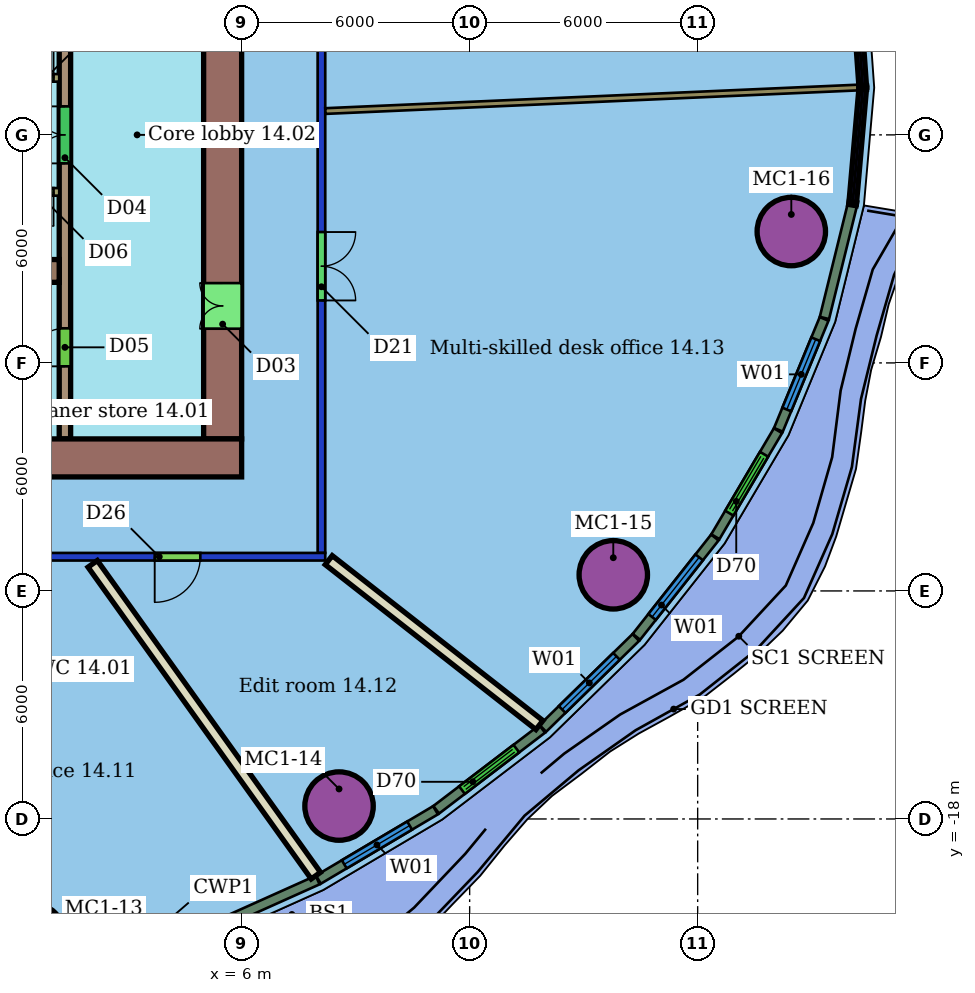
"""IFC4 building model, lengths in metres.
Left out: names, types, materials, properties, quantities, classifications, styles, units other than length and angle.
Written with IfcOpenShell. Run it as: python <this file> out.ifc"""

import sys

from ifc_helpers import new_model, si_unit, direction, frame, frame_2d, origin, origin_2d, place, context, subcontext, project, spatial, rectangle, hollow_circle, extrude, element, fill, save


model = new_model("IFC4")
c1 = context("Model", 3, precision=1e-05, world=origin(), true_north=direction((0.0, 1.0)))
c2 = subcontext(c1, "Body", "Model", "MODEL_VIEW")
j1 = project(units=[si_unit("LENGTHUNIT", "METRE"), si_unit("PLANEANGLEUNIT", "RADIAN")], contexts=[c1])
p1 = place(None, origin())
s1 = spatial("IfcSite", under=j1, at=p1, CompositionType="ELEMENT")
p2 = place(p1, origin())
s2 = spatial("IfcBuilding", under=s1, at=p2, CompositionType="ELEMENT")
p3 = place(p2, frame((0.0, 0.0, 69.3)))
s3 = spatial("IfcBuildingStorey", under=s2, at=p3, CompositionType="ELEMENT", Elevation=69.3)
for number, where, z_axis, x_axis in (
    (1, (0.458, -21.108, 0.0), (0.0, 0.0, 1.0), (1.0, 0.0, 0.0)),
    (2, (8.563, -17.66, 0.0), (0.0, 0.0, 1.0), (1.0, 0.0, 0.0)),
    (3, (15.78, -11.576, 0.0), (0.0, 0.0, 1.0), (1.0, 0.0, 0.0)),
    (4, (20.464, -2.543, 0.0), (0.0, 0.0, 1.0), (1.0, 0.0, 0.0)),
):
    element("IfcColumn", number, at=place(p3, frame(where, z_axis=z_axis, x_axis=x_axis)), inside=s3, PredefinedType="COLUMN", context=c2, shape_type="SweptSolid", body=[
        extrude(hollow_circle(Radius=0.9, WallThickness=0.06, at=origin_2d()), origin(), (0.0, 0.0, 1.0), 3.55),
    ])
p4 = place(p3, frame((8.2, -11.1, 0.0), z_axis=(0.0, 0.0, 1.0), x_axis=(-1.0, 0.0, 0.0)))
e5 = element("IfcWall", 5, at=p4, inside=s3, PredefinedType="PARTITIONING", context=c2, shape_type="SweptSolid", body=[
    extrude(rectangle(XDim=28.4, YDim=0.2, at=frame_2d((14.2, 0.0))), origin(), (0.0, 0.0, 1.0), 2.85),
])
p5 = place(p4, frame((23.811, 0.0, 0.0)))
e6 = element("IfcOpeningElement", 6, at=p5, cuts=e5, PredefinedType="OPENING", context=c2, shape_type="SweptSolid", body=[
    extrude(rectangle(XDim=0.9, YDim=2.1, at=frame_2d((0.45, 1.05))), frame((0.0, 0.11, 0.0), z_axis=(0.0, -1.0, 0.0), x_axis=(1.0, 0.0, 0.0)), (0.0, 0.0, 1.0), 0.22),
])
p6 = place(p4, frame((19.218, 0.0, 0.0)))
e7 = element("IfcOpeningElement", 7, at=p6, cuts=e5, PredefinedType="OPENING", context=c2, shape_type="SweptSolid", body=[
    extrude(rectangle(XDim=1.1, YDim=2.1, at=frame_2d((0.55, 1.05))), frame((0.0, 0.11, 0.0), z_axis=(0.0, -1.0, 0.0), x_axis=(1.0, 0.0, 0.0)), (0.0, 0.0, 1.0), 0.22),
])
p7 = place(p4, frame((14.111, 0.0, 0.0)))
e8 = element("IfcOpeningElement", 8, at=p7, cuts=e5, PredefinedType="OPENING", context=c2, shape_type="SweptSolid", body=[
    extrude(rectangle(XDim=1.0, YDim=2.1, at=frame_2d((0.5, 1.05))), frame((0.0, 0.11, 0.0), z_axis=(0.0, -1.0, 0.0), x_axis=(1.0, 0.0, 0.0)), (0.0, 0.0, 1.0), 0.22),
])
p8 = place(p4, frame((7.977, 0.0, 0.0)))
e9 = element("IfcOpeningElement", 9, at=p8, cuts=e5, PredefinedType="OPENING", context=c2, shape_type="SweptSolid", body=[
    extrude(rectangle(XDim=1.0, YDim=2.1, at=frame_2d((0.5, 1.05))), frame((0.0, 0.11, 0.0), z_axis=(0.0, -1.0, 0.0), x_axis=(1.0, 0.0, 0.0)), (0.0, 0.0, 1.0), 0.22),
])
p9 = place(p4, frame((3.287, 0.0, 0.0)))
e10 = element("IfcOpeningElement", 10, at=p9, cuts=e5, PredefinedType="OPENING", context=c2, shape_type="SweptSolid", body=[
    extrude(rectangle(XDim=1.2, YDim=2.1, at=frame_2d((0.6, 1.05))), frame((0.0, 0.11, 0.0), z_axis=(0.0, -1.0, 0.0), x_axis=(1.0, 0.0, 0.0)), (0.0, 0.0, 1.0), 0.22),
])
p10 = place(p3, frame((8.1, 11.0, 0.0), z_axis=(0.0, 0.0, 1.0), x_axis=(0.0, -1.0, 0.0)))
e11 = element("IfcWall", 11, at=p10, inside=s3, PredefinedType="PARTITIONING", context=c2, shape_type="SweptSolid", body=[
    extrude(rectangle(XDim=22.0, YDim=0.2, at=frame_2d((11.0, 0.0))), origin(), (0.0, 0.0, 1.0), 2.85),
])
p11 = place(p10, frame((13.556, 0.0, 0.0)))
e12 = element("IfcOpeningElement", 12, at=p11, cuts=e11, PredefinedType="OPENING", context=c2, shape_type="SweptSolid", body=[
    extrude(rectangle(XDim=1.8, YDim=2.1, at=frame_2d((0.9, 1.05))), frame((0.0, 0.11, 0.0), z_axis=(0.0, -1.0, 0.0), x_axis=(1.0, 0.0, 0.0)), (0.0, 0.0, 1.0), 0.22),
])
p12 = place(p10, frame((6.879, 0.0, 0.0)))
e13 = element("IfcOpeningElement", 13, at=p12, cuts=e11, PredefinedType="OPENING", context=c2, shape_type="SweptSolid", body=[
    extrude(rectangle(XDim=0.9, YDim=2.1, at=frame_2d((0.45, 1.05))), frame((0.0, 0.11, 0.0), z_axis=(0.0, -1.0, 0.0), x_axis=(1.0, 0.0, 0.0)), (0.0, 0.0, 1.0), 0.22),
])
p13 = place(p3, frame((7.953, -19.491, 0.0), z_axis=(0.0, 0.0, 1.0), x_axis=(-0.582107718731, 0.813111679779, 0.0)))
e14 = element("IfcWall", 14, at=p13, inside=s3, PredefinedType="PARTITIONING", context=c2, shape_type="SweptSolid", body=[
    extrude(rectangle(XDim=10.089, YDim=0.3, at=frame_2d((5.044, 0.0))), origin(), (0.0, 0.0, 1.0), 3.55),
])
p14 = place(p3, frame((13.836, -15.529, 0.0), z_axis=(0.0, 0.0, 1.0), x_axis=(-0.787406195981, 0.616434491678, 0.0)))
e15 = element("IfcWall", 15, at=p14, inside=s3, PredefinedType="PARTITIONING", context=c2, shape_type="SweptSolid", body=[
    extrude(rectangle(XDim=7.04, YDim=0.3, at=frame_2d((3.52, 0.0))), origin(), (0.0, 0.0, 1.0), 3.55),
])
p15 = place(p3, frame((22.221, 1.246, 0.0), z_axis=(0.0, 0.0, 1.0), x_axis=(-0.999027479897, -0.044091885989, 0.0)))
e16 = element("IfcWall", 16, at=p15, inside=s3, PredefinedType="PARTITIONING", context=c2, shape_type="SweptSolid", body=[
    extrude(rectangle(XDim=14.031, YDim=0.15, at=frame_2d((7.016, 0.0))), origin(), (0.0, 0.0, 1.0), 3.55),
])
p16 = place(p3, frame((4.719, -21.08, 0.0), z_axis=(0.0, 0.0, 1.0), x_axis=(0.912212078045, 0.409718347977, 0.0)))
e17 = element("IfcWall", 17, at=p16, inside=s3, PredefinedType="SOLIDWALL", context=c2, shape_type="SweptSolid", body=[
    extrude(rectangle(XDim=3.597, YDim=0.25, at=frame_2d((1.799, 0.0))), origin(), (0.0, 0.0, 1.0), 3.15),
])
p17 = place(p3, frame((8.02, -19.596, 0.0), z_axis=(0.0, 0.0, 1.0), x_axis=(0.860342460641, 0.509716441188, 0.0)))
e18 = element("IfcWall", 18, at=p17, inside=s3, PredefinedType="SOLIDWALL", context=c2, shape_type="SweptSolid", body=[
    extrude(rectangle(XDim=3.582, YDim=0.25, at=frame_2d((1.791, 0.0))), origin(), (0.0, 0.0, 1.0), 3.15),
])
p18 = place(p17, frame((0.791, 0.0, 0.8)))
e19 = element("IfcOpeningElement", 19, at=p18, cuts=e18, PredefinedType="OPENING", context=c2, shape_type="SweptSolid", body=[
    extrude(rectangle(XDim=2.0, YDim=2.2, at=frame_2d((1.0, 1.1))), frame((0.0, 0.135, 0.0), z_axis=(0.0, -1.0, 0.0), x_axis=(1.0, 0.0, 0.0)), (0.0, 0.0, 1.0), 0.27),
])
p19 = place(p3, frame((11.12, -17.758, 0.0), z_axis=(0.0, 0.0, 1.0), x_axis=(0.795035183211, 0.60656331694, 0.0)))
e20 = element("IfcWall", 20, at=p19, inside=s3, PredefinedType="SOLIDWALL", context=c2, shape_type="SweptSolid", body=[
    extrude(rectangle(XDim=3.507, YDim=0.25, at=frame_2d((1.753, 0.0))), origin(), (0.0, 0.0, 1.0), 3.15),
])
p20 = place(p19, frame((0.853, 0.0, 0.0)))
e21 = element("IfcOpeningElement", 21, at=p20, cuts=e20, PredefinedType="OPENING", context=c2, shape_type="SweptSolid", body=[
    extrude(rectangle(XDim=1.8, YDim=2.4, at=frame_2d((0.9, 1.2))), frame((0.0, 0.135, 0.0), z_axis=(0.0, -1.0, 0.0), x_axis=(1.0, 0.0, 0.0)), (0.0, 0.0, 1.0), 0.27),
])
p21 = place(p3, frame((13.926, -15.616, 0.0), z_axis=(0.0, 0.0, 1.0), x_axis=(0.715230982257, 0.698888147001, 0.0)))
e22 = element("IfcWall", 22, at=p21, inside=s3, PredefinedType="SOLIDWALL", context=c2, shape_type="SweptSolid", body=[
    extrude(rectangle(XDim=3.421, YDim=0.25, at=frame_2d((1.71, 0.0))), origin(), (0.0, 0.0, 1.0), 3.15),
])
p22 = place(p21, frame((0.71, 0.0, 0.8)))
e23 = element("IfcOpeningElement", 23, at=p22, cuts=e22, PredefinedType="OPENING", context=c2, shape_type="SweptSolid", body=[
    extrude(rectangle(XDim=2.0, YDim=2.2, at=frame_2d((1.0, 1.1))), frame((0.0, 0.135, 0.0), z_axis=(0.0, -1.0, 0.0), x_axis=(1.0, 0.0, 0.0)), (0.0, 0.0, 1.0), 0.27),
])
p23 = place(p3, frame((16.388, -13.207, 0.0), z_axis=(0.0, 0.0, 1.0), x_axis=(0.619836825524, 0.784730724341, 0.0)))
e24 = element("IfcWall", 24, at=p23, inside=s3, PredefinedType="SOLIDWALL", context=c2, shape_type="SweptSolid", body=[
    extrude(rectangle(XDim=3.33, YDim=0.25, at=frame_2d((1.665, 0.0))), origin(), (0.0, 0.0, 1.0), 3.15),
])
p24 = place(p23, frame((0.665, 0.0, 0.8)))
e25 = element("IfcOpeningElement", 25, at=p24, cuts=e24, PredefinedType="OPENING", context=c2, shape_type="SweptSolid", body=[
    extrude(rectangle(XDim=2.0, YDim=2.2, at=frame_2d((1.0, 1.1))), frame((0.0, 0.135, 0.0), z_axis=(0.0, -1.0, 0.0), x_axis=(1.0, 0.0, 0.0)), (0.0, 0.0, 1.0), 0.27),
])
p25 = place(p3, frame((18.466, -10.573, 0.0), z_axis=(0.0, 0.0, 1.0), x_axis=(0.508376359917, 0.861134993295, 0.0)))
e26 = element("IfcWall", 26, at=p25, inside=s3, PredefinedType="SOLIDWALL", context=c2, shape_type="SweptSolid", body=[
    extrude(rectangle(XDim=3.24, YDim=0.25, at=frame_2d((1.62, 0.0))), origin(), (0.0, 0.0, 1.0), 3.15),
])
p26 = place(p25, frame((0.72, 0.0, 0.0)))
e27 = element("IfcOpeningElement", 27, at=p26, cuts=e26, PredefinedType="OPENING", context=c2, shape_type="SweptSolid", body=[
    extrude(rectangle(XDim=1.8, YDim=2.4, at=frame_2d((0.9, 1.2))), frame((0.0, 0.135, 0.0), z_axis=(0.0, -1.0, 0.0), x_axis=(1.0, 0.0, 0.0)), (0.0, 0.0, 1.0), 0.27),
])
p27 = place(p3, frame((20.125, -7.76, 0.0), z_axis=(0.0, 0.0, 1.0), x_axis=(0.381026005506, 0.924564320709, 0.0)))
e28 = element("IfcWall", 28, at=p27, inside=s3, PredefinedType="SOLIDWALL", context=c2, shape_type="SweptSolid", body=[
    extrude(rectangle(XDim=3.156, YDim=0.25, at=frame_2d((1.578, 0.0))), origin(), (0.0, 0.0, 1.0), 3.15),
])
p28 = place(p27, frame((0.578, 0.0, 0.8)))
e29 = element("IfcOpeningElement", 29, at=p28, cuts=e28, PredefinedType="OPENING", context=c2, shape_type="SweptSolid", body=[
    extrude(rectangle(XDim=2.0, YDim=2.2, at=frame_2d((1.0, 1.1))), frame((0.0, 0.135, 0.0), z_axis=(0.0, -1.0, 0.0), x_axis=(1.0, 0.0, 0.0)), (0.0, 0.0, 1.0), 0.27),
])
p29 = place(p3, frame((21.336, -4.817, 0.0), z_axis=(0.0, 0.0, 1.0), x_axis=(0.239572615753, 0.97087844851, 0.0)))
e30 = element("IfcWall", 30, at=p29, inside=s3, PredefinedType="SOLIDWALL", context=c2, shape_type="SweptSolid", body=[
    extrude(rectangle(XDim=3.045, YDim=0.25, at=frame_2d((1.522, 0.0))), origin(), (0.0, 0.0, 1.0), 3.15),
])
p30 = place(p3, frame((-18.0, -8.5, 0.0), z_axis=(0.0, 0.0, 1.0), x_axis=(1.0, 0.0, 0.0)))
e31 = element("IfcWall", 31, at=p30, inside=s3, PredefinedType="SHEAR", context=c2, shape_type="SweptSolid", body=[
    extrude(rectangle(XDim=24.0, YDim=1.0, at=frame_2d((12.0, 0.0))), origin(), (0.0, 0.0, 1.0), 3.4),
])
p31 = place(p30, frame((6.0, 0.0, 0.0)))
e32 = element("IfcOpeningElement", 32, at=p31, cuts=e31, PredefinedType="OPENING", context=c2, shape_type="SweptSolid", body=[
    extrude(rectangle(XDim=1.2, YDim=2.1, at=frame_2d((0.6, 1.05))), frame((0.0, 0.51, 0.0), z_axis=(0.0, -1.0, 0.0), x_axis=(1.0, 0.0, 0.0)), (0.0, 0.0, 1.0), 1.02),
])
p32 = place(p3, frame((5.5, -8.0, 0.0), z_axis=(0.0, 0.0, 1.0), x_axis=(0.0, 1.0, 0.0)))
e33 = element("IfcWall", 33, at=p32, inside=s3, PredefinedType="SHEAR", context=c2, shape_type="SweptSolid", body=[
    extrude(rectangle(XDim=16.0, YDim=1.0, at=frame_2d((8.0, 0.0))), origin(), (0.0, 0.0, 1.0), 3.4),
])
p33 = place(p32, frame((2.9, 0.0, 0.0)))
e34 = element("IfcOpeningElement", 34, at=p33, cuts=e33, PredefinedType="OPENING", context=c2, shape_type="SweptSolid", body=[
    extrude(rectangle(XDim=1.2, YDim=2.1, at=frame_2d((0.6, 1.05))), frame((0.0, 0.51, 0.0), z_axis=(0.0, -1.0, 0.0), x_axis=(1.0, 0.0, 0.0)), (0.0, 0.0, 1.0), 1.02),
])
p34 = place(p32, frame((11.9, 0.0, 0.0)))
e35 = element("IfcOpeningElement", 35, at=p34, cuts=e33, PredefinedType="OPENING", context=c2, shape_type="SweptSolid", body=[
    extrude(rectangle(XDim=1.2, YDim=2.1, at=frame_2d((0.6, 1.05))), frame((0.0, 0.51, 0.0), z_axis=(0.0, -1.0, 0.0), x_axis=(1.0, 0.0, 0.0)), (0.0, 0.0, 1.0), 1.02),
])
p35 = place(p3, frame((-6.0, -3.58, 0.0), z_axis=(0.0, 0.0, 1.0), x_axis=(1.0, 0.0, 0.0)))
e36 = element("IfcWall", 36, at=p35, inside=s3, PredefinedType="SHEAR", context=c2, shape_type="SweptSolid", body=[
    extrude(rectangle(XDim=7.2, YDim=0.6, at=frame_2d((3.6, 0.0))), origin(), (0.0, 0.0, 1.0), 3.4),
])
p36 = place(p3, frame((1.35, -8.0, 0.0), z_axis=(0.0, 0.0, 1.0), x_axis=(0.0, 1.0, 0.0)))
e37 = element("IfcWall", 37, at=p36, inside=s3, PredefinedType="SHEAR", context=c2, shape_type="SweptSolid", body=[
    extrude(rectangle(XDim=16.0, YDim=0.3, at=frame_2d((8.0, 0.0))), origin(), (0.0, 0.0, 1.0), 3.4),
])
p37 = place(p36, frame((1.91, 0.0, 0.0)))
e38 = element("IfcOpeningElement", 38, at=p37, cuts=e37, PredefinedType="OPENING", context=c2, shape_type="SweptSolid", body=[
    extrude(rectangle(XDim=1.0, YDim=2.1, at=frame_2d((0.5, 1.05))), frame((0.0, 0.16, 0.0), z_axis=(0.0, -1.0, 0.0), x_axis=(1.0, 0.0, 0.0)), (0.0, 0.0, 1.0), 0.32),
])
p38 = place(p36, frame((7.25, 0.0, 0.0)))
e39 = element("IfcOpeningElement", 39, at=p38, cuts=e37, PredefinedType="OPENING", context=c2, shape_type="SweptSolid", body=[
    extrude(rectangle(XDim=1.5, YDim=2.1, at=frame_2d((0.75, 1.05))), frame((0.0, 0.16, 0.0), z_axis=(0.0, -1.0, 0.0), x_axis=(1.0, 0.0, 0.0)), (0.0, 0.0, 1.0), 0.32),
])
p39 = place(p3, frame((-13.2, 1.5, 0.0), z_axis=(0.0, 0.0, 1.0), x_axis=(1.0, 0.0, 0.0)))
e40 = element("IfcWall", 40, at=p39, inside=s3, PredefinedType="SHEAR", context=c2, shape_type="SweptSolid", body=[
    extrude(rectangle(XDim=14.4, YDim=0.2, at=frame_2d((7.2, 0.0))), origin(), (0.0, 0.0, 1.0), 3.4),
])
p40 = place(p39, frame((0.546, 0.0, 0.0)))
e41 = element("IfcOpeningElement", 41, at=p40, cuts=e40, PredefinedType="OPENING", context=c2, shape_type="SweptSolid", body=[
    extrude(rectangle(XDim=1.1, YDim=2.1, at=frame_2d((0.55, 1.05))), frame((0.0, 0.11, 0.0), z_axis=(0.0, -1.0, 0.0), x_axis=(1.0, 0.0, 0.0)), (0.0, 0.0, 1.0), 0.22),
])
p41 = place(p39, frame((2.988, 0.0, 0.0)))
e42 = element("IfcOpeningElement", 42, at=p41, cuts=e40, PredefinedType="OPENING", context=c2, shape_type="SweptSolid", body=[
    extrude(rectangle(XDim=1.1, YDim=2.1, at=frame_2d((0.55, 1.05))), frame((0.0, 0.11, 0.0), z_axis=(0.0, -1.0, 0.0), x_axis=(1.0, 0.0, 0.0)), (0.0, 0.0, 1.0), 0.22),
])
p42 = place(p39, frame((5.429, 0.0, 0.0)))
e43 = element("IfcOpeningElement", 43, at=p42, cuts=e40, PredefinedType="OPENING", context=c2, shape_type="SweptSolid", body=[
    extrude(rectangle(XDim=1.1, YDim=2.1, at=frame_2d((0.55, 1.05))), frame((0.0, 0.11, 0.0), z_axis=(0.0, -1.0, 0.0), x_axis=(1.0, 0.0, 0.0)), (0.0, 0.0, 1.0), 0.22),
])
p43 = place(p39, frame((7.871, 0.0, 0.0)))
e44 = element("IfcOpeningElement", 44, at=p43, cuts=e40, PredefinedType="OPENING", context=c2, shape_type="SweptSolid", body=[
    extrude(rectangle(XDim=1.1, YDim=2.1, at=frame_2d((0.55, 1.05))), frame((0.0, 0.11, 0.0), z_axis=(0.0, -1.0, 0.0), x_axis=(1.0, 0.0, 0.0)), (0.0, 0.0, 1.0), 0.22),
])
p44 = place(p39, frame((11.607, 0.0, 0.0)))
e45 = element("IfcOpeningElement", 45, at=p44, cuts=e40, PredefinedType="OPENING", context=c2, shape_type="SweptSolid", body=[
    extrude(rectangle(XDim=0.9, YDim=2.1, at=frame_2d((0.45, 1.05))), frame((0.0, 0.11, 0.0), z_axis=(0.0, -1.0, 0.0), x_axis=(1.0, 0.0, 0.0)), (0.0, 0.0, 1.0), 0.22),
])
p45 = place(p39, frame((13.25, 0.0, 0.0)))
e46 = element("IfcOpeningElement", 46, at=p45, cuts=e40, PredefinedType="OPENING", context=c2, shape_type="SweptSolid", body=[
    extrude(rectangle(XDim=1.0, YDim=2.1, at=frame_2d((0.5, 1.05))), frame((0.0, 0.11, 0.0), z_axis=(0.0, -1.0, 0.0), x_axis=(1.0, 0.0, 0.0)), (0.0, 0.0, 1.0), 0.22),
])
p46 = place(p3, frame((1.2, -1.5, 0.0), z_axis=(0.0, 0.0, 1.0), x_axis=(-1.0, 0.0, 0.0)))
e47 = element("IfcWall", 47, at=p46, inside=s3, PredefinedType="SHEAR", context=c2, shape_type="SweptSolid", body=[
    extrude(rectangle(XDim=14.4, YDim=0.2, at=frame_2d((7.2, 0.0))), origin(), (0.0, 0.0, 1.0), 3.4),
])
p47 = place(p46, frame((7.821, 0.0, 0.0)))
e48 = element("IfcOpeningElement", 48, at=p47, cuts=e47, PredefinedType="OPENING", context=c2, shape_type="SweptSolid", body=[
    extrude(rectangle(XDim=1.2, YDim=2.1, at=frame_2d((0.6, 1.05))), frame((0.0, 0.11, 0.0), z_axis=(0.0, -1.0, 0.0), x_axis=(1.0, 0.0, 0.0)), (0.0, 0.0, 1.0), 0.22),
])
p48 = place(p46, frame((0.15, 0.0, 0.0)))
e49 = element("IfcOpeningElement", 49, at=p48, cuts=e47, PredefinedType="OPENING", context=c2, shape_type="SweptSolid", body=[
    extrude(rectangle(XDim=0.9, YDim=2.1, at=frame_2d((0.45, 1.05))), frame((0.0, 0.11, 0.0), z_axis=(0.0, -1.0, 0.0), x_axis=(1.0, 0.0, 0.0)), (0.0, 0.0, 1.0), 0.22),
])
p49 = place(p9, origin())
e50 = element("IfcDoor", 50, at=p49, inside=s3, OperationType="SINGLE_SWING_RIGHT", PredefinedType="DOOR", context=c2, shape_type="SweptSolid", body=[
    extrude(rectangle(XDim=1.2, YDim=2.1, at=frame_2d((0.6, 1.05))), frame((0.0, 0.025, 0.0), z_axis=(0.0, -1.0, 0.0), x_axis=(1.0, 0.0, 0.0)), (0.0, 0.0, 1.0), 0.05),
])
fill(e10, e50)
p50 = place(p11, origin())
e51 = element("IfcDoor", 51, at=p50, inside=s3, OperationType="DOUBLE_DOOR_SINGLE_SWING", PredefinedType="DOOR", context=c2, shape_type="SweptSolid", body=[
    extrude(rectangle(XDim=1.8, YDim=2.1, at=frame_2d((0.9, 1.05))), frame((0.0, 0.025, 0.0), z_axis=(0.0, -1.0, 0.0), x_axis=(1.0, 0.0, 0.0)), (0.0, 0.0, 1.0), 0.05),
])
fill(e12, e51)
p51 = place(p18, origin())
e52 = element("IfcWindow", 52, at=p51, inside=s3, PartitioningType="SINGLE_PANEL", PredefinedType="WINDOW", context=c2, shape_type="SweptSolid", body=[
    extrude(rectangle(XDim=2.0, YDim=2.2, at=frame_2d((1.0, 1.1))), frame((0.0, 0.03, 0.0), z_axis=(0.0, -1.0, 0.0), x_axis=(1.0, 0.0, 0.0)), (0.0, 0.0, 1.0), 0.06),
])
fill(e19, e52)
p52 = place(p20, origin())
e53 = element("IfcDoor", 53, at=p52, inside=s3, OperationType="DOUBLE_DOOR_SLIDING", PredefinedType="DOOR", context=c2, shape_type="SweptSolid", body=[
    extrude(rectangle(XDim=1.8, YDim=2.4, at=frame_2d((0.9, 1.2))), frame((0.0, 0.025, 0.0), z_axis=(0.0, -1.0, 0.0), x_axis=(1.0, 0.0, 0.0)), (0.0, 0.0, 1.0), 0.05),
])
fill(e21, e53)
p53 = place(p22, origin())
e54 = element("IfcWindow", 54, at=p53, inside=s3, PartitioningType="SINGLE_PANEL", PredefinedType="WINDOW", context=c2, shape_type="SweptSolid", body=[
    extrude(rectangle(XDim=2.0, YDim=2.2, at=frame_2d((1.0, 1.1))), frame((0.0, 0.03, 0.0), z_axis=(0.0, -1.0, 0.0), x_axis=(1.0, 0.0, 0.0)), (0.0, 0.0, 1.0), 0.06),
])
fill(e23, e54)
p54 = place(p24, origin())
e55 = element("IfcWindow", 55, at=p54, inside=s3, PartitioningType="SINGLE_PANEL", PredefinedType="WINDOW", context=c2, shape_type="SweptSolid", body=[
    extrude(rectangle(XDim=2.0, YDim=2.2, at=frame_2d((1.0, 1.1))), frame((0.0, 0.03, 0.0), z_axis=(0.0, -1.0, 0.0), x_axis=(1.0, 0.0, 0.0)), (0.0, 0.0, 1.0), 0.06),
])
fill(e25, e55)
p55 = place(p26, origin())
e56 = element("IfcDoor", 56, at=p55, inside=s3, OperationType="DOUBLE_DOOR_SLIDING", PredefinedType="DOOR", context=c2, shape_type="SweptSolid", body=[
    extrude(rectangle(XDim=1.8, YDim=2.4, at=frame_2d((0.9, 1.2))), frame((0.0, 0.025, 0.0), z_axis=(0.0, -1.0, 0.0), x_axis=(1.0, 0.0, 0.0)), (0.0, 0.0, 1.0), 0.05),
])
fill(e27, e56)
p56 = place(p28, origin())
e57 = element("IfcWindow", 57, at=p56, inside=s3, PartitioningType="SINGLE_PANEL", PredefinedType="WINDOW", context=c2, shape_type="SweptSolid", body=[
    extrude(rectangle(XDim=2.0, YDim=2.2, at=frame_2d((1.0, 1.1))), frame((0.0, 0.03, 0.0), z_axis=(0.0, -1.0, 0.0), x_axis=(1.0, 0.0, 0.0)), (0.0, 0.0, 1.0), 0.06),
])
fill(e29, e57)
p57 = place(p33, origin())
e58 = element("IfcDoor", 58, at=p57, inside=s3, OperationType="DOUBLE_DOOR_SINGLE_SWING", PredefinedType="NOTDEFINED", context=c2, shape_type="SweptSolid", body=[
    extrude(rectangle(XDim=1.2, YDim=2.1, at=frame_2d((0.6, 1.05))), frame((0.0, 0.025, 0.0), z_axis=(0.0, -1.0, 0.0), x_axis=(1.0, 0.0, 0.0)), (0.0, 0.0, 1.0), 0.05),
])
fill(e34, e58)
p58 = place(p37, origin())
e59 = element("IfcDoor", 59, at=p58, inside=s3, OperationType="SINGLE_SWING_LEFT", PredefinedType="NOTDEFINED", context=c2, shape_type="SweptSolid", body=[
    extrude(rectangle(XDim=1.0, YDim=2.1, at=frame_2d((0.5, 1.05))), frame((0.0, 0.025, 0.0), z_axis=(0.0, -1.0, 0.0), x_axis=(1.0, 0.0, 0.0)), (0.0, 0.0, 1.0), 0.05),
])
fill(e38, e59)
p59 = place(p38, origin())
e60 = element("IfcDoor", 60, at=p59, inside=s3, OperationType="DOUBLE_DOOR_SINGLE_SWING", PredefinedType="NOTDEFINED", context=c2, shape_type="SweptSolid", body=[
    extrude(rectangle(XDim=1.5, YDim=2.1, at=frame_2d((0.75, 1.05))), frame((0.0, 0.025, 0.0), z_axis=(0.0, -1.0, 0.0), x_axis=(1.0, 0.0, 0.0)), (0.0, 0.0, 1.0), 0.05),
])
fill(e39, e60)
p60 = place(p45, origin())
e61 = element("IfcDoor", 61, at=p60, inside=s3, OperationType="SINGLE_SWING_RIGHT", PredefinedType="NOTDEFINED", context=c2, shape_type="SweptSolid", body=[
    extrude(rectangle(XDim=1.0, YDim=2.1, at=frame_2d((0.5, 1.05))), frame((0.0, 0.025, 0.0), z_axis=(0.0, -1.0, 0.0), x_axis=(1.0, 0.0, 0.0)), (0.0, 0.0, 1.0), 0.05),
])
fill(e46, e61)
p61 = place(p48, origin())
e62 = element("IfcDoor", 62, at=p61, inside=s3, OperationType="SINGLE_SWING_LEFT", PredefinedType="NOTDEFINED", context=c2, shape_type="SweptSolid", body=[
    extrude(rectangle(XDim=0.9, YDim=2.1, at=frame_2d((0.45, 1.05))), frame((0.0, 0.025, 0.0), z_axis=(0.0, -1.0, 0.0), x_axis=(1.0, 0.0, 0.0)), (0.0, 0.0, 1.0), 0.05),
])
fill(e49, e62)
save(model, sys.argv[1])
